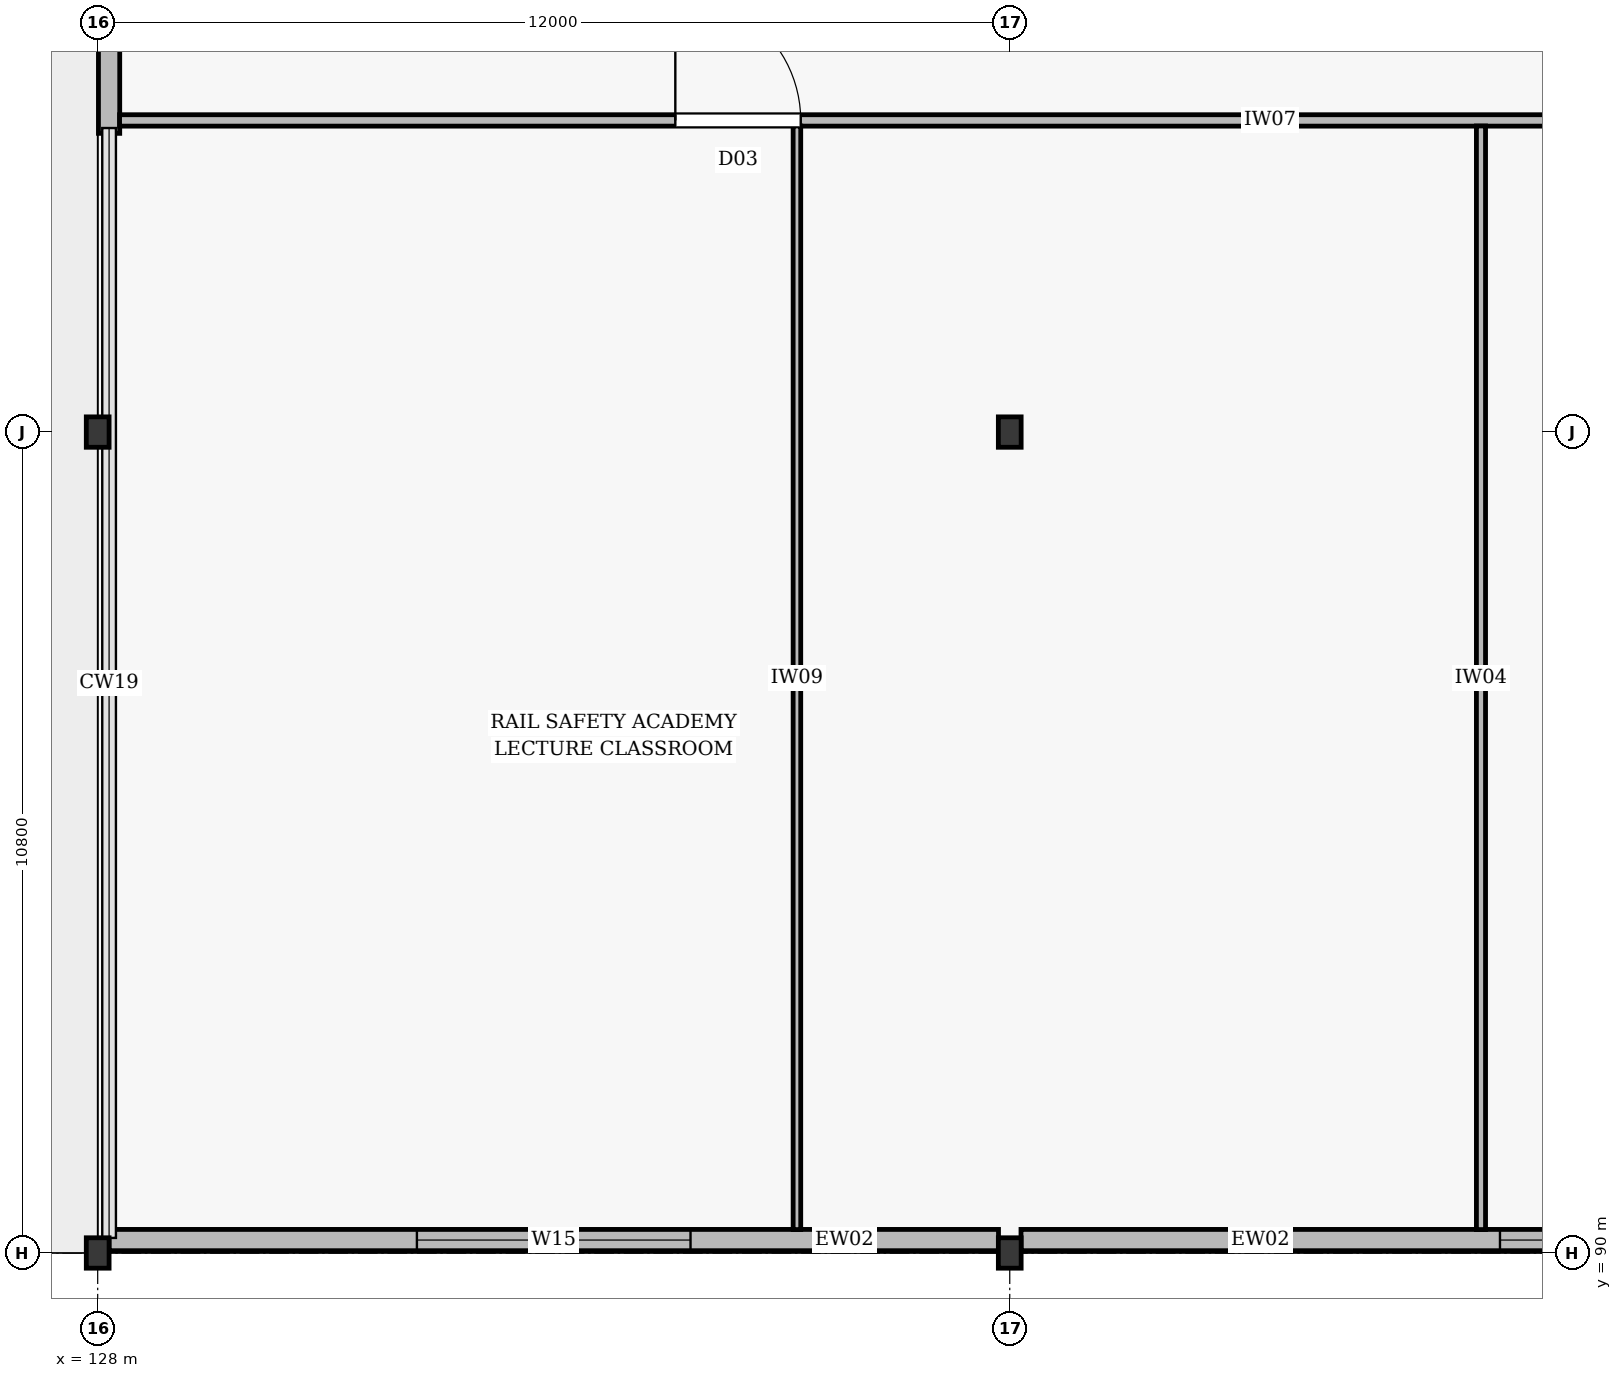
"""IFC4 building model, lengths in metres.
Left out: names, types, materials, properties, quantities, classifications, styles, units other than length and angle.
Written with IfcOpenShell. Run it as: python <this file> out.ifc"""

import sys

from ifc_helpers import new_model, si_unit, direction, frame, frame_2d, origin, origin_2d, place, context, subcontext, project, spatial, rectangle, i_section, extrude, element, fill, save


model = new_model("IFC4")
c1 = context("Model", 3, precision=1e-05, world=origin(), true_north=direction((0.0, 1.0)))
c2 = subcontext(c1, "Body", "Model", "MODEL_VIEW")
j1 = project(units=[si_unit("LENGTHUNIT", "METRE"), si_unit("PLANEANGLEUNIT", "RADIAN")], contexts=[c1])
p1 = place(None, origin())
s1 = spatial("IfcSite", under=j1, at=p1, CompositionType="ELEMENT")
p2 = place(p1, origin())
s2 = spatial("IfcBuilding", under=s1, at=p2, CompositionType="ELEMENT")
p3 = place(p2, frame((0.0, 0.0, 21.3)))
s3 = spatial("IfcBuildingStorey", under=s2, at=p3, CompositionType="ELEMENT", Elevation=21.3)
for number, where, z_axis, x_axis in (
    (1, (128.0, 90.0, 0.0), (0.0, 0.0, 1.0), (1.0, 0.0, 0.0)),
    (2, (128.0, 100.8, 0.0), (0.0, 0.0, 1.0), (1.0, 0.0, 0.0)),
    (3, (140.0, 90.0, 0.0), (0.0, 0.0, 1.0), (1.0, 0.0, 0.0)),
    (4, (140.0, 100.8, 0.0), (0.0, 0.0, 1.0), (1.0, 0.0, 0.0)),
):
    element("IfcColumn", number, at=place(p3, frame(where, z_axis=z_axis, x_axis=x_axis)), inside=s3, PredefinedType="COLUMN", context=c2, shape_type="SweptSolid", body=[
        extrude(i_section(OverallWidth=0.3, OverallDepth=0.4, WebThickness=0.013, FlangeThickness=0.024, at=origin_2d()), origin(), (0.0, 0.0, 1.0), 3.9),
    ])
p4 = place(p3, frame((128.148, 90.17, 0.0), z_axis=(0.0, 0.0, 1.0), x_axis=(1.0, 0.0, 0.0)))
e5 = element("IfcWall", 5, at=p4, inside=s3, PredefinedType="STANDARD", context=c2, shape_type="SweptSolid", body=[
    extrude(rectangle(XDim=11.704, YDim=0.28, at=frame_2d((5.852, 0.0))), origin(), (0.0, 0.0, 1.0), 3.12),
])
p5 = place(p4, frame((4.052, 0.0, 1.05)))
e6 = element("IfcOpeningElement", 6, at=p5, cuts=e5, PredefinedType="OPENING", context=c2, shape_type="SweptSolid", body=[
    extrude(rectangle(XDim=3.6, YDim=1.4, at=frame_2d((1.8, 0.7))), frame((0.0, 0.152, 0.0), z_axis=(0.0, -1.0, 0.0), x_axis=(1.0, 0.0, 0.0)), (0.0, 0.0, 1.0), 0.304),
])
p6 = place(p3, frame((140.148, 90.17, 0.0), z_axis=(0.0, 0.0, 1.0), x_axis=(1.0, 0.0, 0.0)))
e7 = element("IfcWall", 7, at=p6, inside=s3, PredefinedType="STANDARD", context=c2, shape_type="SweptSolid", body=[
    extrude(rectangle(XDim=12.704, YDim=0.28, at=frame_2d((6.352, 0.0))), origin(), (0.0, 0.0, 1.0), 3.12),
])
p7 = place(p6, frame((6.302, 0.0, 1.05)))
e8 = element("IfcOpeningElement", 8, at=p7, cuts=e7, PredefinedType="OPENING", context=c2, shape_type="SweptSolid", body=[
    extrude(rectangle(XDim=3.6, YDim=1.4, at=frame_2d((1.8, 0.7))), frame((0.0, 0.152, 0.0), z_axis=(0.0, -1.0, 0.0), x_axis=(1.0, 0.0, 0.0)), (0.0, 0.0, 1.0), 0.304),
])
p8 = place(p3, frame((128.15, 104.73, 0.0), z_axis=(0.0, 0.0, 1.0), x_axis=(0.0, 1.0, 0.0)))
e9 = element("IfcWall", 9, at=p8, inside=s3, PredefinedType="STANDARD", context=c2, shape_type="SweptSolid", body=[
    extrude(rectangle(XDim=4.34, YDim=0.28, at=frame_2d((2.17, 0.0))), origin(), (0.0, 0.0, 1.0), 3.35),
])
p9 = place(p8, frame((1.1, 0.0, 0.005)))
e10 = element("IfcOpeningElement", 10, at=p9, cuts=e9, PredefinedType="OPENING", context=c2, shape_type="SweptSolid", body=[
    extrude(rectangle(XDim=2.1, YDim=2.3, at=frame_2d((1.05, 1.15))), frame((0.0, 0.152, 0.0), z_axis=(0.0, -1.0, 0.0), x_axis=(1.0, 0.0, 0.0)), (0.0, 0.0, 1.0), 0.304),
])
p10 = place(p3, frame((128.288, 104.9, 0.0), z_axis=(0.0, 0.0, 1.0), x_axis=(1.0, 0.0, 0.0)))
e11 = element("IfcWall", 11, at=p10, inside=s3, PredefinedType="PARTITIONING", context=c2, shape_type="SweptSolid", body=[
    extrude(rectangle(XDim=30.412, YDim=0.15, at=frame_2d((15.206, 0.0))), origin(), (0.0, 0.0, 1.0), 3.33),
])
p11 = place(p10, frame((7.312, 0.0, 0.005)))
e12 = element("IfcOpeningElement", 12, at=p11, cuts=e11, PredefinedType="OPENING", context=c2, shape_type="SweptSolid", body=[
    extrude(rectangle(XDim=1.65, YDim=2.2, at=frame_2d((0.825, 1.1))), frame((0.0, 0.087, 0.0), z_axis=(0.0, -1.0, 0.0), x_axis=(1.0, 0.0, 0.0)), (0.0, 0.0, 1.0), 0.174),
])
p12 = place(p10, frame((21.312, 0.0, 0.005)))
e13 = element("IfcOpeningElement", 13, at=p12, cuts=e11, PredefinedType="OPENING", context=c2, shape_type="SweptSolid", body=[
    extrude(rectangle(XDim=1.1, YDim=2.1, at=frame_2d((0.55, 1.05))), frame((0.0, 0.087, 0.0), z_axis=(0.0, -1.0, 0.0), x_axis=(1.0, 0.0, 0.0)), (0.0, 0.0, 1.0), 0.174),
])
p13 = place(p3, frame((146.2, 90.308, 0.0), z_axis=(0.0, 0.0, 1.0), x_axis=(0.0, 1.0, 0.0)))
e14 = element("IfcWall", 14, at=p13, inside=s3, PredefinedType="PARTITIONING", context=c2, shape_type="SweptSolid", body=[
    extrude(rectangle(XDim=14.519, YDim=0.12, at=frame_2d((7.259, 0.0))), origin(), (0.0, 0.0, 1.0), 3.12),
])
p14 = place(p3, frame((137.2, 90.308, 0.0), z_axis=(0.0, 0.0, 1.0), x_axis=(0.0, 1.0, 0.0)))
e15 = element("IfcWall", 15, at=p14, inside=s3, PredefinedType="MOVABLE", context=c2, shape_type="SweptSolid", body=[
    extrude(rectangle(XDim=14.519, YDim=0.1, at=frame_2d((7.259, 0.0))), origin(), (0.0, 0.0, 1.0), 3.37),
])
p15 = place(p5, origin())
e16 = element("IfcWindow", 16, at=p15, inside=s3, PartitioningType="DOUBLE_PANEL_VERTICAL", PredefinedType="WINDOW", context=c2, shape_type="SweptSolid", body=[
    extrude(rectangle(XDim=3.6, YDim=1.4, at=frame_2d((1.8, 0.7))), frame((0.0, 0.03, 0.0), z_axis=(0.0, -1.0, 0.0), x_axis=(1.0, 0.0, 0.0)), (0.0, 0.0, 1.0), 0.06),
])
fill(e6, e16)
p16 = place(p7, origin())
e17 = element("IfcWindow", 17, at=p16, inside=s3, PartitioningType="DOUBLE_PANEL_VERTICAL", PredefinedType="WINDOW", context=c2, shape_type="SweptSolid", body=[
    extrude(rectangle(XDim=3.6, YDim=1.4, at=frame_2d((1.8, 0.7))), frame((0.0, 0.03, 0.0), z_axis=(0.0, -1.0, 0.0), x_axis=(1.0, 0.0, 0.0)), (0.0, 0.0, 1.0), 0.06),
])
fill(e8, e17)
p17 = place(p11, origin())
e18 = element("IfcDoor", 18, at=p17, inside=s3, OperationType="DOUBLE_DOOR_SINGLE_SWING", PredefinedType="DOOR", context=c2, shape_type="SweptSolid", body=[
    extrude(rectangle(XDim=1.65, YDim=2.2, at=frame_2d((0.825, 1.1))), frame((0.0, 0.025, 0.0), z_axis=(0.0, -1.0, 0.0), x_axis=(1.0, 0.0, 0.0)), (0.0, 0.0, 1.0), 0.05),
])
fill(e12, e18)
save(model, sys.argv[1])
